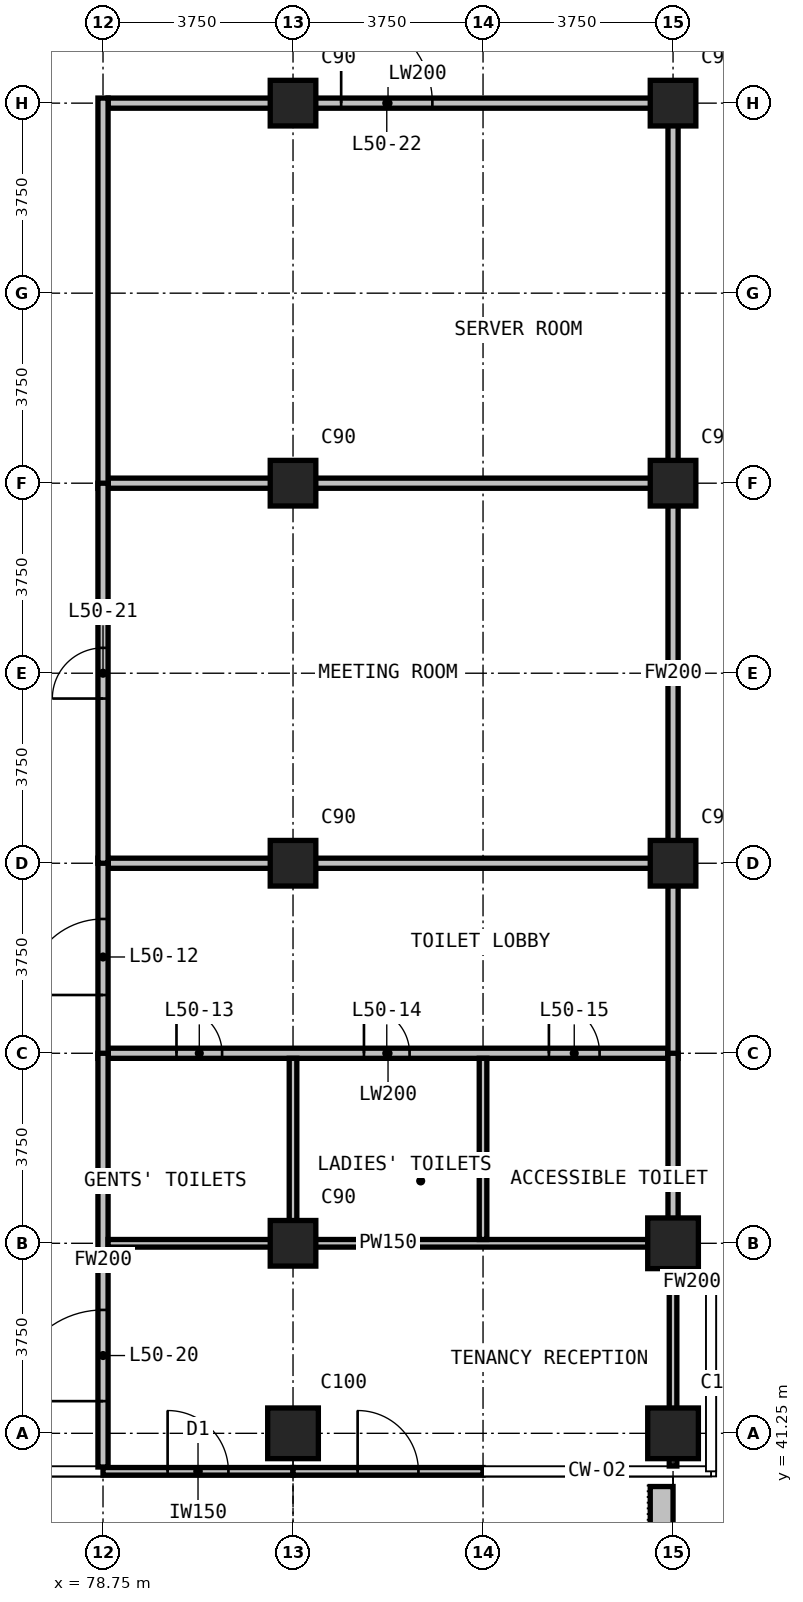
"""IFC4 building model, lengths in metres.
Left out: names, types, materials, properties, quantities, classifications, styles, units other than length and angle.
Written with IfcOpenShell. Run it as: python <this file> out.ifc"""

import sys

from ifc_helpers import new_model, si_unit, direction, frame, frame_2d, origin, origin_2d, place, context, subcontext, project, spatial, rectangle, extrude, element, fill, save


model = new_model("IFC4")
c1 = context("Model", 3, precision=1e-05, world=origin(), true_north=direction((0.0, 1.0)))
c2 = subcontext(c1, "Body", "Model", "MODEL_VIEW")
j1 = project(units=[si_unit("LENGTHUNIT", "METRE"), si_unit("PLANEANGLEUNIT", "RADIAN")], contexts=[c1])
p1 = place(None, origin())
s1 = spatial("IfcSite", under=j1, at=p1, CompositionType="ELEMENT")
p2 = place(p1, origin())
s2 = spatial("IfcBuilding", under=s1, at=p2, CompositionType="ELEMENT")
p3 = place(p2, frame((0.0, 0.0, 195.9)))
s3 = spatial("IfcBuildingStorey", under=s2, at=p3, CompositionType="ELEMENT", Elevation=195.9)
p4 = place(p3, frame((82.5, 41.25, 0.0), z_axis=(0.0, 0.0, 1.0), x_axis=(1.0, 0.0, 0.0)))
e1 = element("IfcColumn", 1, at=p4, inside=s3, PredefinedType="COLUMN", context=c2, shape_type="SweptSolid", body=[
    extrude(rectangle(XDim=1.0, YDim=1.0, at=origin_2d()), origin(), (0.0, 0.0, 1.0), 3.6),
])
for number, where, z_axis, x_axis in (
    (2, (82.5, 45.0, 0.0), (0.0, 0.0, 1.0), (1.0, 0.0, 0.0)),
    (3, (82.5, 52.5, 0.0), (0.0, 0.0, 1.0), (1.0, 0.0, 0.0)),
    (4, (82.5, 60.0, 0.0), (0.0, 0.0, 1.0), (1.0, 0.0, 0.0)),
    (5, (82.5, 67.5, 0.0), (0.0, 0.0, 1.0), (1.0, 0.0, 0.0)),
):
    element("IfcColumn", number, at=place(p3, frame(where, z_axis=z_axis, x_axis=x_axis)), inside=s3, PredefinedType="COLUMN", context=c2, shape_type="SweptSolid", body=[
        extrude(rectangle(XDim=0.9, YDim=0.9, at=origin_2d()), origin(), (0.0, 0.0, 1.0), 3.6),
    ])
for number, where, z_axis, x_axis in (
    (6, (90.0, 41.25, 0.0), (0.0, 0.0, 1.0), (1.0, 0.0, 0.0)),
    (7, (90.0, 45.0, 0.0), (0.0, 0.0, 1.0), (1.0, 0.0, 0.0)),
):
    element("IfcColumn", number, at=place(p3, frame(where, z_axis=z_axis, x_axis=x_axis)), inside=s3, PredefinedType="COLUMN", context=c2, shape_type="SweptSolid", body=[
        extrude(rectangle(XDim=1.0, YDim=1.0, at=origin_2d()), origin(), (0.0, 0.0, 1.0), 3.6),
    ])
for number, where, z_axis, x_axis in (
    (8, (90.0, 52.5, 0.0), (0.0, 0.0, 1.0), (1.0, 0.0, 0.0)),
    (9, (90.0, 60.0, 0.0), (0.0, 0.0, 1.0), (1.0, 0.0, 0.0)),
    (10, (90.0, 67.5, 0.0), (0.0, 0.0, 1.0), (1.0, 0.0, 0.0)),
):
    element("IfcColumn", number, at=place(p3, frame(where, z_axis=z_axis, x_axis=x_axis)), inside=s3, PredefinedType="COLUMN", context=c2, shape_type="SweptSolid", body=[
        extrude(rectangle(XDim=0.9, YDim=0.9, at=origin_2d()), origin(), (0.0, 0.0, 1.0), 3.6),
    ])
p5 = place(p3, frame((78.75, 40.5, 0.0), z_axis=(0.0, 0.0, 1.0), x_axis=(1.0, 0.0, 0.0)))
e11 = element("IfcWall", 11, at=p5, inside=s3, PredefinedType="SOLIDWALL", context=c2, shape_type="SweptSolid", body=[
    extrude(rectangle(XDim=3.75, YDim=0.15, at=frame_2d((1.875, 0.0))), origin(), (0.0, 0.0, 1.0), 3.3),
])
p6 = place(p5, frame((1.275, 0.0, 0.0)))
e12 = element("IfcOpeningElement", 12, at=p6, cuts=e11, PredefinedType="OPENING", context=c2, shape_type="SweptSolid", body=[
    extrude(rectangle(XDim=1.2, YDim=2.4, at=frame_2d((0.6, 1.2))), frame((0.0, 0.085, 0.0), z_axis=(0.0, -1.0, 0.0), x_axis=(1.0, 0.0, 0.0)), (0.0, 0.0, 1.0), 0.17),
])
p7 = place(p3, frame((82.5, 40.5, 0.0), z_axis=(0.0, 0.0, 1.0), x_axis=(1.0, 0.0, 0.0)))
e13 = element("IfcWall", 13, at=p7, inside=s3, PredefinedType="SOLIDWALL", context=c2, shape_type="SweptSolid", body=[
    extrude(rectangle(XDim=3.75, YDim=0.15, at=frame_2d((1.875, 0.0))), origin(), (0.0, 0.0, 1.0), 3.3),
])
p8 = place(p7, frame((1.275, 0.0, 0.0)))
e14 = element("IfcOpeningElement", 14, at=p8, cuts=e13, PredefinedType="OPENING", context=c2, shape_type="SweptSolid", body=[
    extrude(rectangle(XDim=1.2, YDim=2.4, at=frame_2d((0.6, 1.2))), frame((0.0, 0.085, 0.0), z_axis=(0.0, -1.0, 0.0), x_axis=(1.0, 0.0, 0.0)), (0.0, 0.0, 1.0), 0.17),
])
p9 = place(p3, frame((89.775, 40.2, 0.0), z_axis=(0.0, 0.0, 1.0), x_axis=(0.0, -1.0, 0.0)))
e15 = element("IfcWall", 15, at=p9, inside=s3, PredefinedType="USERDEFINED", context=c2, shape_type="SweptSolid", body=[
    extrude(rectangle(XDim=2.35, YDim=0.45, at=frame_2d((1.175, 0.0))), origin(), (0.0, 0.0, 1.0), 1.1),
])
p10 = place(p3, frame((78.85, 48.75, 0.0), z_axis=(0.0, 0.0, 1.0), x_axis=(1.0, 0.0, 0.0)))
e16 = element("IfcWall", 16, at=p10, inside=s3, PredefinedType="PARTITIONING", context=c2, shape_type="SweptSolid", body=[
    extrude(rectangle(XDim=11.05, YDim=0.2, at=frame_2d((5.525, 0.0))), origin(), (0.0, 0.0, 1.0), 3.3),
])
p11 = place(p10, frame((1.35, 0.0, 0.0)))
e17 = element("IfcOpeningElement", 17, at=p11, cuts=e16, PredefinedType="OPENING", context=c2, shape_type="SweptSolid", body=[
    extrude(rectangle(XDim=0.9, YDim=2.2, at=frame_2d((0.45, 1.1))), frame((0.0, 0.11, 0.0), z_axis=(0.0, -1.0, 0.0), x_axis=(1.0, 0.0, 0.0)), (0.0, 0.0, 1.0), 0.22),
])
p12 = place(p10, frame((5.05, 0.0, 0.0)))
e18 = element("IfcOpeningElement", 18, at=p12, cuts=e16, PredefinedType="OPENING", context=c2, shape_type="SweptSolid", body=[
    extrude(rectangle(XDim=0.9, YDim=2.2, at=frame_2d((0.45, 1.1))), frame((0.0, 0.11, 0.0), z_axis=(0.0, -1.0, 0.0), x_axis=(1.0, 0.0, 0.0)), (0.0, 0.0, 1.0), 0.22),
])
p13 = place(p10, frame((8.7, 0.0, 0.0)))
e19 = element("IfcOpeningElement", 19, at=p13, cuts=e16, PredefinedType="OPENING", context=c2, shape_type="SweptSolid", body=[
    extrude(rectangle(XDim=1.0, YDim=2.2, at=frame_2d((0.5, 1.1))), frame((0.0, 0.11, 0.0), z_axis=(0.0, -1.0, 0.0), x_axis=(1.0, 0.0, 0.0)), (0.0, 0.0, 1.0), 0.22),
])
for number, where, z_axis, x_axis in (
    (20, (78.85, 52.5, 0.0), (0.0, 0.0, 1.0), (1.0, 0.0, 0.0)),
    (21, (78.85, 60.0, 0.0), (0.0, 0.0, 1.0), (1.0, 0.0, 0.0)),
):
    element("IfcWall", number, at=place(p3, frame(where, z_axis=z_axis, x_axis=x_axis)), inside=s3, PredefinedType="PARTITIONING", context=c2, shape_type="SweptSolid", body=[
        extrude(rectangle(XDim=11.05, YDim=0.2, at=frame_2d((5.525, 0.0))), origin(), (0.0, 0.0, 1.0), 3.3),
    ])
p14 = place(p3, frame((78.85, 67.5, 0.0), z_axis=(0.0, 0.0, 1.0), x_axis=(1.0, 0.0, 0.0)))
e22 = element("IfcWall", 22, at=p14, inside=s3, PredefinedType="PARTITIONING", context=c2, shape_type="SweptSolid", body=[
    extrude(rectangle(XDim=11.05, YDim=0.2, at=frame_2d((5.525, 0.0))), origin(), (0.0, 0.0, 1.0), 3.3),
])
p15 = place(p14, frame((4.6, 0.0, 0.0)))
e23 = element("IfcOpeningElement", 23, at=p15, cuts=e22, PredefinedType="OPENING", context=c2, shape_type="SweptSolid", body=[
    extrude(rectangle(XDim=1.8, YDim=2.4, at=frame_2d((0.9, 1.2))), frame((0.0, 0.11, 0.0), z_axis=(0.0, -1.0, 0.0), x_axis=(1.0, 0.0, 0.0)), (0.0, 0.0, 1.0), 0.22),
])
p16 = place(p3, frame((78.75, 48.65, 0.0), z_axis=(0.0, 0.0, 1.0), x_axis=(0.0, 1.0, 0.0)))
e24 = element("IfcWall", 24, at=p16, inside=s3, PredefinedType="PARTITIONING", context=c2, shape_type="SweptSolid", body=[
    extrude(rectangle(XDim=3.95, YDim=0.2, at=frame_2d((1.975, 0.0))), origin(), (0.0, 0.0, 1.0), 3.3),
])
p17 = place(p16, frame((1.25, 0.0, 0.0)))
e25 = element("IfcOpeningElement", 25, at=p17, cuts=e24, PredefinedType="OPENING", context=c2, shape_type="SweptSolid", body=[
    extrude(rectangle(XDim=1.5, YDim=2.2, at=frame_2d((0.75, 1.1))), frame((0.0, 0.11, 0.0), z_axis=(0.0, -1.0, 0.0), x_axis=(1.0, 0.0, 0.0)), (0.0, 0.0, 1.0), 0.22),
])
p18 = place(p3, frame((78.75, 59.9, 0.0), z_axis=(0.0, 0.0, 1.0), x_axis=(0.0, 1.0, 0.0)))
e26 = element("IfcWall", 26, at=p18, inside=s3, PredefinedType="PARTITIONING", context=c2, shape_type="SweptSolid", body=[
    extrude(rectangle(XDim=7.7, YDim=0.2, at=frame_2d((3.85, 0.0))), origin(), (0.0, 0.0, 1.0), 3.3),
])
p19 = place(p3, frame((90.0, 48.65, 0.0), z_axis=(0.0, 0.0, 1.0), x_axis=(0.0, 1.0, 0.0)))
e27 = element("IfcWall", 27, at=p19, inside=s3, PredefinedType="PARTITIONING", context=c2, shape_type="SweptSolid", body=[
    extrude(rectangle(XDim=3.95, YDim=0.2, at=frame_2d((1.975, 0.0))), origin(), (0.0, 0.0, 1.0), 3.3),
])
p20 = place(p3, frame((90.0, 59.9, 0.0), z_axis=(0.0, 0.0, 1.0), x_axis=(0.0, 1.0, 0.0)))
e28 = element("IfcWall", 28, at=p20, inside=s3, PredefinedType="PARTITIONING", context=c2, shape_type="SweptSolid", body=[
    extrude(rectangle(XDim=7.7, YDim=0.2, at=frame_2d((3.85, 0.0))), origin(), (0.0, 0.0, 1.0), 3.3),
])
p21 = place(p3, frame((90.1, 44.235, 0.0), z_axis=(0.0, 0.0, 1.0), x_axis=(1.0, 0.0, 0.0)))
e29 = element("IfcWall", 29, at=p21, inside=s3, PredefinedType="PARTITIONING", context=c2, shape_type="SweptSolid", body=[
    extrude(rectangle(XDim=0.545, YDim=0.2, at=frame_2d((0.272, 0.0))), origin(), (0.0, 0.0, 1.0), 3.3),
])
p22 = place(p3, frame((78.75, 40.585, 0.0), z_axis=(0.0, 0.0, 1.0), x_axis=(0.0, 1.0, 0.0)))
e30 = element("IfcWall", 30, at=p22, inside=s3, PredefinedType="PARTITIONING", context=c2, shape_type="SweptSolid", body=[
    extrude(rectangle(XDim=8.165, YDim=0.2, at=frame_2d((4.083, 0.0))), origin(), (0.0, 0.0, 1.0), 3.3),
])
p23 = place(p22, frame((1.3, 0.0, 0.0)))
e31 = element("IfcOpeningElement", 31, at=p23, cuts=e30, PredefinedType="OPENING", context=c2, shape_type="SweptSolid", body=[
    extrude(rectangle(XDim=1.8, YDim=2.2, at=frame_2d((0.9, 1.1))), frame((0.0, 0.11, 0.0), z_axis=(0.0, -1.0, 0.0), x_axis=(1.0, 0.0, 0.0)), (0.0, 0.0, 1.0), 0.22),
])
p24 = place(p3, frame((78.75, 52.5, 0.0), z_axis=(0.0, 0.0, 1.0), x_axis=(0.0, 1.0, 0.0)))
e32 = element("IfcWall", 32, at=p24, inside=s3, PredefinedType="PARTITIONING", context=c2, shape_type="SweptSolid", body=[
    extrude(rectangle(XDim=7.5, YDim=0.2, at=frame_2d((3.75, 0.0))), origin(), (0.0, 0.0, 1.0), 3.3),
])
p25 = place(p24, frame((3.25, 0.0, 0.0)))
e33 = element("IfcOpeningElement", 33, at=p25, cuts=e32, PredefinedType="OPENING", context=c2, shape_type="SweptSolid", body=[
    extrude(rectangle(XDim=1.0, YDim=2.2, at=frame_2d((0.5, 1.1))), frame((0.0, 0.11, 0.0), z_axis=(0.0, -1.0, 0.0), x_axis=(1.0, 0.0, 0.0)), (0.0, 0.0, 1.0), 0.22),
])
p26 = place(p3, frame((90.0, 44.135, 0.0), z_axis=(0.0, 0.0, 1.0), x_axis=(0.0, 1.0, 0.0)))
e34 = element("IfcWall", 34, at=p26, inside=s3, PredefinedType="PARTITIONING", context=c2, shape_type="SweptSolid", body=[
    extrude(rectangle(XDim=4.615, YDim=0.2, at=frame_2d((2.308, 0.0))), origin(), (0.0, 0.0, 1.0), 3.3),
])
p27 = place(p3, frame((90.0, 52.5, 0.0), z_axis=(0.0, 0.0, 1.0), x_axis=(0.0, 1.0, 0.0)))
e35 = element("IfcWall", 35, at=p27, inside=s3, PredefinedType="PARTITIONING", context=c2, shape_type="SweptSolid", body=[
    extrude(rectangle(XDim=7.5, YDim=0.2, at=frame_2d((3.75, 0.0))), origin(), (0.0, 0.0, 1.0), 3.3),
])
p28 = place(p3, frame((78.85, 45.0, 0.0), z_axis=(0.0, 0.0, 1.0), x_axis=(1.0, 0.0, 0.0)))
e36 = element("IfcWall", 36, at=p28, inside=s3, PredefinedType="PARTITIONING", context=c2, shape_type="SweptSolid", body=[
    extrude(rectangle(XDim=11.05, YDim=0.15, at=frame_2d((5.525, 0.0))), origin(), (0.0, 0.0, 1.0), 3.3),
])
for number, where, z_axis, x_axis in (
    (37, (82.5, 45.075, 0.0), (0.0, 0.0, 1.0), (0.0, 1.0, 0.0)),
    (38, (86.25, 45.075, 0.0), (0.0, 0.0, 1.0), (0.0, 1.0, 0.0)),
):
    element("IfcWall", number, at=place(p3, frame(where, z_axis=z_axis, x_axis=x_axis)), inside=s3, PredefinedType="PARTITIONING", context=c2, shape_type="SweptSolid", body=[
        extrude(rectangle(XDim=3.575, YDim=0.15, at=frame_2d((1.788, 0.0))), origin(), (0.0, 0.0, 1.0), 3.3),
    ])
p29 = place(p3, frame((90.0, 40.605, 0.0), z_axis=(0.0, 0.0, 1.0), x_axis=(0.0, 1.0, 0.0)))
e39 = element("IfcWall", 39, at=p29, inside=s3, PredefinedType="PARTITIONING", context=c2, shape_type="SweptSolid", body=[
    extrude(rectangle(XDim=3.6, YDim=0.15, at=frame_2d((1.8, 0.0))), origin(), (0.0, 0.0, 1.0), 3.3),
])
p30 = place(p6, origin())
e40 = element("IfcDoor", 40, at=p30, inside=s3, OperationType="SINGLE_SWING_LEFT", PredefinedType="DOOR", context=c2, shape_type="SweptSolid", body=[
    extrude(rectangle(XDim=1.2, YDim=2.4, at=frame_2d((0.6, 1.2))), frame((0.0, 0.025, 0.0), z_axis=(0.0, -1.0, 0.0), x_axis=(1.0, 0.0, 0.0)), (0.0, 0.0, 1.0), 0.05),
])
fill(e12, e40)
p31 = place(p8, origin())
e41 = element("IfcDoor", 41, at=p31, inside=s3, OperationType="SINGLE_SWING_LEFT", PredefinedType="DOOR", context=c2, shape_type="SweptSolid", body=[
    extrude(rectangle(XDim=1.2, YDim=2.4, at=frame_2d((0.6, 1.2))), frame((0.0, 0.025, 0.0), z_axis=(0.0, -1.0, 0.0), x_axis=(1.0, 0.0, 0.0)), (0.0, 0.0, 1.0), 0.05),
])
fill(e14, e41)
p32 = place(p17, origin())
e42 = element("IfcDoor", 42, at=p32, inside=s3, OperationType="DOUBLE_DOOR_SINGLE_SWING", PredefinedType="DOOR", context=c2, shape_type="SweptSolid", body=[
    extrude(rectangle(XDim=1.5, YDim=2.2, at=frame_2d((0.75, 1.1))), frame((0.0, 0.025, 0.0), z_axis=(0.0, -1.0, 0.0), x_axis=(1.0, 0.0, 0.0)), (0.0, 0.0, 1.0), 0.05),
])
fill(e25, e42)
p33 = place(p11, origin())
e43 = element("IfcDoor", 43, at=p33, inside=s3, OperationType="SINGLE_SWING_LEFT", PredefinedType="DOOR", context=c2, shape_type="SweptSolid", body=[
    extrude(rectangle(XDim=0.9, YDim=2.2, at=frame_2d((0.45, 1.1))), frame((0.0, 0.025, 0.0), z_axis=(0.0, -1.0, 0.0), x_axis=(1.0, 0.0, 0.0)), (0.0, 0.0, 1.0), 0.05),
])
fill(e17, e43)
p34 = place(p12, origin())
e44 = element("IfcDoor", 44, at=p34, inside=s3, OperationType="SINGLE_SWING_LEFT", PredefinedType="DOOR", context=c2, shape_type="SweptSolid", body=[
    extrude(rectangle(XDim=0.9, YDim=2.2, at=frame_2d((0.45, 1.1))), frame((0.0, 0.025, 0.0), z_axis=(0.0, -1.0, 0.0), x_axis=(1.0, 0.0, 0.0)), (0.0, 0.0, 1.0), 0.05),
])
fill(e18, e44)
p35 = place(p13, origin())
e45 = element("IfcDoor", 45, at=p35, inside=s3, OperationType="SINGLE_SWING_LEFT", PredefinedType="DOOR", context=c2, shape_type="SweptSolid", body=[
    extrude(rectangle(XDim=1.0, YDim=2.2, at=frame_2d((0.5, 1.1))), frame((0.0, 0.025, 0.0), z_axis=(0.0, -1.0, 0.0), x_axis=(1.0, 0.0, 0.0)), (0.0, 0.0, 1.0), 0.05),
])
fill(e19, e45)
p36 = place(p23, origin())
e46 = element("IfcDoor", 46, at=p36, inside=s3, OperationType="DOUBLE_DOOR_SINGLE_SWING", PredefinedType="DOOR", context=c2, shape_type="SweptSolid", body=[
    extrude(rectangle(XDim=1.8, YDim=2.2, at=frame_2d((0.9, 1.1))), frame((0.0, 0.025, 0.0), z_axis=(0.0, -1.0, 0.0), x_axis=(1.0, 0.0, 0.0)), (0.0, 0.0, 1.0), 0.05),
])
fill(e31, e46)
p37 = place(p25, origin())
e47 = element("IfcDoor", 47, at=p37, inside=s3, OperationType="SINGLE_SWING_LEFT", PredefinedType="DOOR", context=c2, shape_type="SweptSolid", body=[
    extrude(rectangle(XDim=1.0, YDim=2.2, at=frame_2d((0.5, 1.1))), frame((0.0, 0.025, 0.0), z_axis=(0.0, -1.0, 0.0), x_axis=(1.0, 0.0, 0.0)), (0.0, 0.0, 1.0), 0.05),
])
fill(e33, e47)
p38 = place(p15, origin())
e48 = element("IfcDoor", 48, at=p38, inside=s3, OperationType="DOUBLE_DOOR_SINGLE_SWING", PredefinedType="DOOR", context=c2, shape_type="SweptSolid", body=[
    extrude(rectangle(XDim=1.8, YDim=2.4, at=frame_2d((0.9, 1.2))), frame((0.0, 0.025, 0.0), z_axis=(0.0, -1.0, 0.0), x_axis=(1.0, 0.0, 0.0)), (0.0, 0.0, 1.0), 0.05),
])
fill(e23, e48)
save(model, sys.argv[1])
